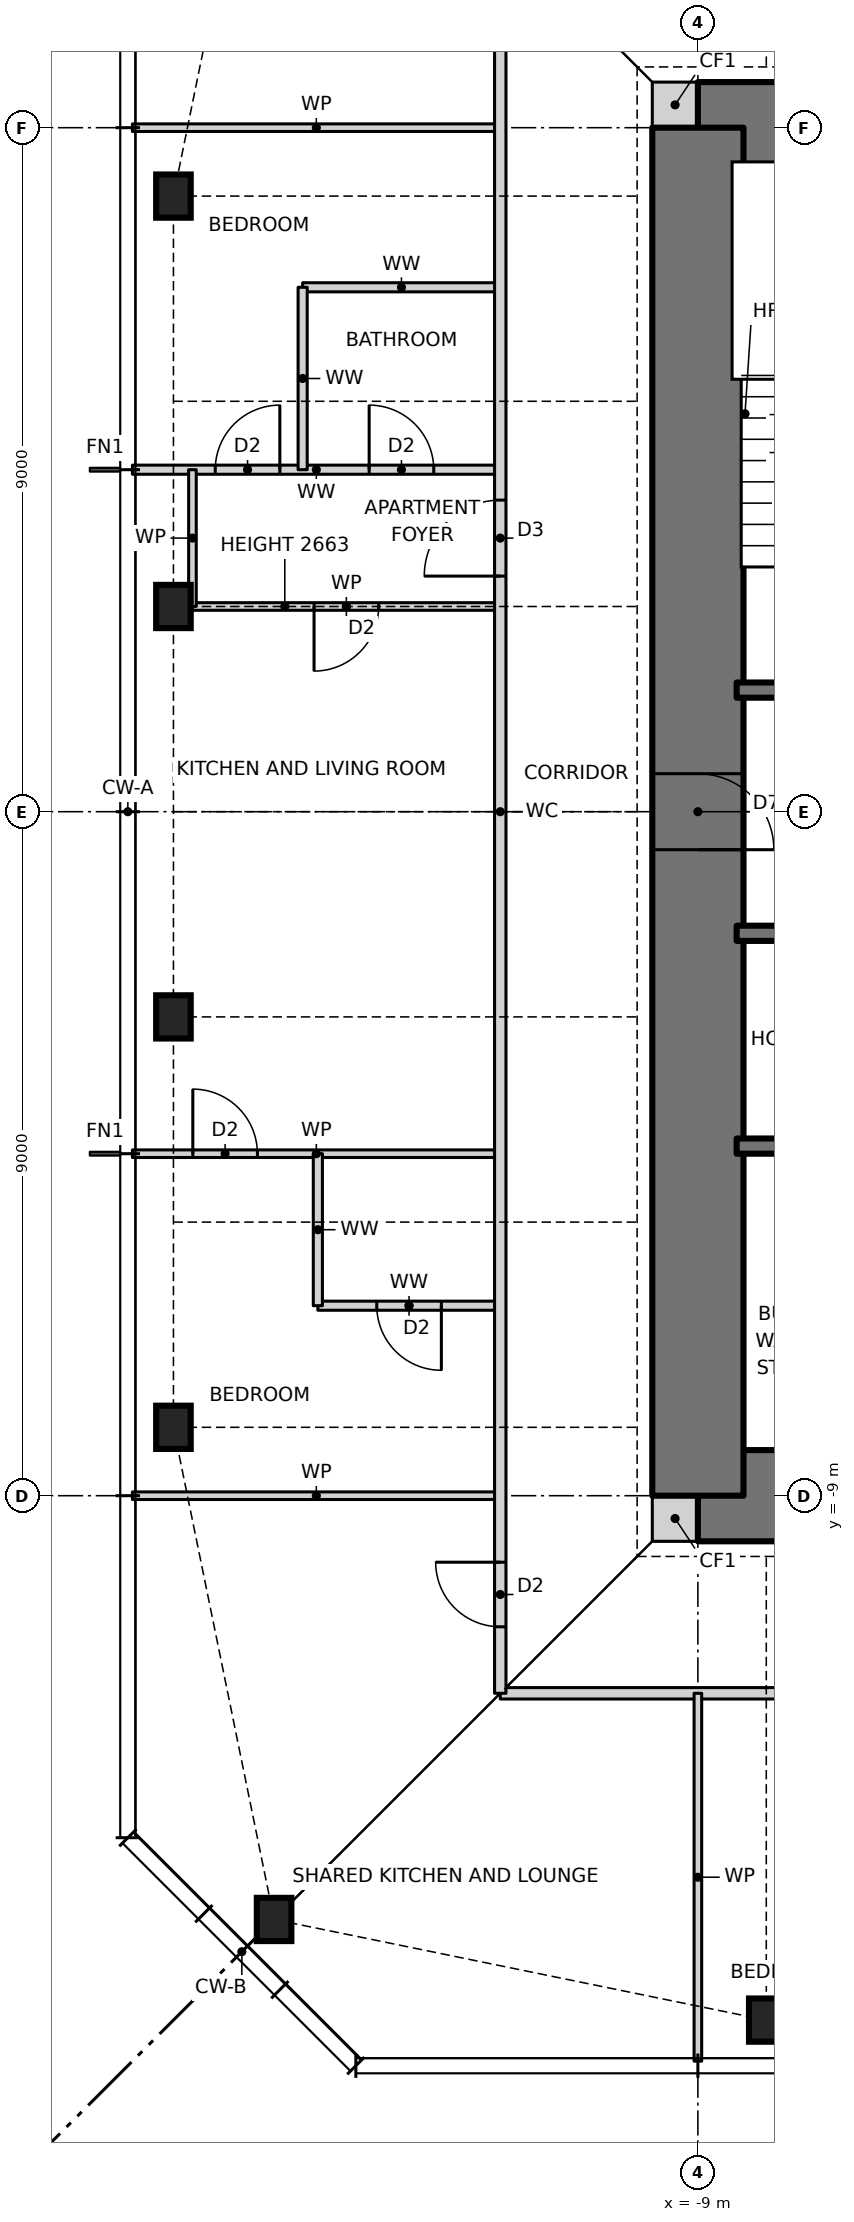
"""IFC4 building model, lengths in metres.
Left out: names, types, materials, properties, quantities, classifications, styles, units other than length and angle.
Written with IfcOpenShell. Run it as: python <this file> out.ifc"""

import sys

from ifc_helpers import new_model, si_unit, direction, frame, frame_2d, origin, origin_2d, place, context, subcontext, project, spatial, rectangle, i_section, extrude, element, fill, save


model = new_model("IFC4")
c1 = context("Model", 3, precision=1e-05, world=origin(), true_north=direction((0.0, 1.0)))
c2 = subcontext(c1, "Body", "Model", "MODEL_VIEW")
j1 = project(units=[si_unit("LENGTHUNIT", "METRE"), si_unit("PLANEANGLEUNIT", "RADIAN")], contexts=[c1])
p1 = place(None, origin())
s1 = spatial("IfcSite", under=j1, at=p1, CompositionType="ELEMENT")
p2 = place(p1, origin())
s2 = spatial("IfcBuilding", under=s1, at=p2, CompositionType="ELEMENT")
p3 = place(p2, frame((0.0, 0.0, 246.5)))
s3 = spatial("IfcBuildingStorey", under=s2, at=p3, CompositionType="ELEMENT", Elevation=246.5)
for number, where, z_axis, x_axis in (
    (1, (-14.576, -14.576, 0.0), (0.0, 0.0, 1.0), (1.0, 0.0, 0.0)),
    (2, (-8.1, -15.9, 0.0), (0.0, 0.0, 1.0), (1.0, 0.0, 0.0)),
    (3, (-15.9, 8.1, 0.0), (0.0, 0.0, 1.0), (1.0, 0.0, 0.0)),
    (4, (-15.9, 2.7, 0.0), (0.0, 0.0, 1.0), (1.0, 0.0, 0.0)),
    (5, (-15.9, -2.7, 0.0), (0.0, 0.0, 1.0), (1.0, 0.0, 0.0)),
    (6, (-15.9, -8.1, 0.0), (0.0, 0.0, 1.0), (1.0, 0.0, 0.0)),
):
    element("IfcColumn", number, at=place(p3, frame(where, z_axis=z_axis, x_axis=x_axis)), inside=s3, PredefinedType="COLUMN", context=c2, shape_type="SweptSolid", body=[
        extrude(i_section(OverallWidth=0.455, OverallDepth=0.569, WebThickness=0.078, FlangeThickness=0.125, at=origin_2d()), origin(), (0.0, 0.0, 1.0), 3.5),
    ])
for number, where, z_axis, x_axis in (
    (7, (-9.6, -9.3, 0.0), (0.0, 0.0, 1.0), (1.0, 0.0, 0.0)),
    (8, (-9.6, 9.3, 0.0), (0.0, 0.0, 1.0), (1.0, 0.0, 0.0)),
):
    element("IfcWall", number, at=place(p3, frame(where, z_axis=z_axis, x_axis=x_axis)), inside=s3, PredefinedType="SOLIDWALL", context=c2, shape_type="SweptSolid", body=[
        extrude(rectangle(XDim=0.6, YDim=0.6, at=frame_2d((0.3, 0.0))), origin(), (0.0, 0.0, 1.0), 3.5),
    ])
p4 = place(p3, frame((-9.0, -9.0, 0.0), z_axis=(0.0, 0.0, 1.0), x_axis=(1.0, 0.0, 0.0)))
e9 = element("IfcWall", 9, at=p4, inside=s3, PredefinedType="SHEAR", context=c2, shape_type="SweptSolid", body=[
    extrude(rectangle(XDim=18.0, YDim=1.2, at=frame_2d((9.0, 0.0))), origin(), (0.0, 0.0, 1.0), 3.5),
])
p5 = place(p4, frame((3.775, 0.0, 0.0)))
e10 = element("IfcOpeningElement", 10, at=p5, cuts=e9, PredefinedType="OPENING", context=c2, shape_type="SweptSolid", body=[
    extrude(rectangle(XDim=0.9, YDim=2.1, at=frame_2d((0.45, 1.05))), frame((0.0, 0.61, 0.0), z_axis=(0.0, -1.0, 0.0), x_axis=(1.0, 0.0, 0.0)), (0.0, 0.0, 1.0), 1.22),
])
p6 = place(p4, frame((10.625, 0.0, 0.0)))
e11 = element("IfcOpeningElement", 11, at=p6, cuts=e9, PredefinedType="OPENING", context=c2, shape_type="SweptSolid", body=[
    extrude(rectangle(XDim=0.9, YDim=2.1, at=frame_2d((0.45, 1.05))), frame((0.0, 0.61, 0.0), z_axis=(0.0, -1.0, 0.0), x_axis=(1.0, 0.0, 0.0)), (0.0, 0.0, 1.0), 1.22),
])
p7 = place(p3, frame((9.0, 9.0, 0.0), z_axis=(0.0, 0.0, 1.0), x_axis=(-1.0, 0.0, 0.0)))
e12 = element("IfcWall", 12, at=p7, inside=s3, PredefinedType="SHEAR", context=c2, shape_type="SweptSolid", body=[
    extrude(rectangle(XDim=18.0, YDim=1.2, at=frame_2d((9.0, 0.0))), origin(), (0.0, 0.0, 1.0), 3.5),
])
p8 = place(p7, frame((11.125, 0.0, 0.0)))
e13 = element("IfcOpeningElement", 13, at=p8, cuts=e12, PredefinedType="OPENING", context=c2, shape_type="SweptSolid", body=[
    extrude(rectangle(XDim=0.9, YDim=2.1, at=frame_2d((0.45, 1.05))), frame((0.0, 0.61, 0.0), z_axis=(0.0, -1.0, 0.0), x_axis=(1.0, 0.0, 0.0)), (0.0, 0.0, 1.0), 1.22),
])
p9 = place(p7, frame((4.275, 0.0, 0.0)))
e14 = element("IfcOpeningElement", 14, at=p9, cuts=e12, PredefinedType="OPENING", context=c2, shape_type="SweptSolid", body=[
    extrude(rectangle(XDim=0.9, YDim=2.1, at=frame_2d((0.45, 1.05))), frame((0.0, 0.61, 0.0), z_axis=(0.0, -1.0, 0.0), x_axis=(1.0, 0.0, 0.0)), (0.0, 0.0, 1.0), 1.22),
])
p10 = place(p3, frame((-9.0, 9.0, 0.0), z_axis=(0.0, 0.0, 1.0), x_axis=(0.0, -1.0, 0.0)))
e15 = element("IfcWall", 15, at=p10, inside=s3, PredefinedType="SHEAR", context=c2, shape_type="SweptSolid", body=[
    extrude(rectangle(XDim=18.0, YDim=1.2, at=frame_2d((9.0, 0.0))), origin(), (0.0, 0.0, 1.0), 3.5),
])
p11 = place(p10, frame((8.5, 0.0, 0.0)))
e16 = element("IfcOpeningElement", 16, at=p11, cuts=e15, PredefinedType="OPENING", context=c2, shape_type="SweptSolid", body=[
    extrude(rectangle(XDim=1.0, YDim=2.1, at=frame_2d((0.5, 1.05))), frame((0.0, 0.61, 0.0), z_axis=(0.0, -1.0, 0.0), x_axis=(1.0, 0.0, 0.0)), (0.0, 0.0, 1.0), 1.22),
])
p12 = place(p3, frame((-11.6, -11.6, 0.0), z_axis=(0.0, 0.0, 1.0), x_axis=(1.0, 0.0, 0.0)))
e17 = element("IfcWall", 17, at=p12, inside=s3, PredefinedType="PARTITIONING", context=c2, shape_type="SweptSolid", body=[
    extrude(rectangle(XDim=23.2, YDim=0.15, at=frame_2d((11.6, 0.0))), origin(), (0.0, 0.0, 1.0), 3.27),
])
p13 = place(p12, frame((7.5, 0.0, 0.0)))
e18 = element("IfcOpeningElement", 18, at=p13, cuts=e17, PredefinedType="OPENING", context=c2, shape_type="SweptSolid", body=[
    extrude(rectangle(XDim=1.0, YDim=2.1, at=frame_2d((0.5, 1.05))), frame((0.0, 0.085, 0.0), z_axis=(0.0, -1.0, 0.0), x_axis=(1.0, 0.0, 0.0)), (0.0, 0.0, 1.0), 0.17),
])
p14 = place(p12, frame((21.0, 0.0, 0.0)))
e19 = element("IfcOpeningElement", 19, at=p14, cuts=e17, PredefinedType="OPENING", context=c2, shape_type="SweptSolid", body=[
    extrude(rectangle(XDim=1.8, YDim=2.1, at=frame_2d((0.9, 1.05))), frame((0.0, 0.085, 0.0), z_axis=(0.0, -1.0, 0.0), x_axis=(1.0, 0.0, 0.0)), (0.0, 0.0, 1.0), 0.17),
])
p15 = place(p3, frame((-16.44, -9.0, 0.0), z_axis=(0.0, 0.0, 1.0), x_axis=(1.0, 0.0, 0.0)))
e20 = element("IfcWall", 20, at=p15, inside=s3, PredefinedType="PARTITIONING", context=c2, shape_type="SweptSolid", body=[
    extrude(rectangle(XDim=4.84, YDim=0.1, at=frame_2d((2.42, 0.0))), origin(), (0.0, 0.0, 1.0), 3.27),
])
p16 = place(p3, frame((-14.0, -6.5, 0.0), z_axis=(0.0, 0.0, 1.0), x_axis=(1.0, 0.0, 0.0)))
e21 = element("IfcWall", 21, at=p16, inside=s3, PredefinedType="PARTITIONING", context=c2, shape_type="SweptSolid", body=[
    extrude(rectangle(XDim=2.4, YDim=0.12, at=frame_2d((1.2, 0.0))), origin(), (0.0, 0.0, 1.0), 3.27),
])
p17 = place(p16, frame((0.775, 0.0, 0.0)))
e22 = element("IfcOpeningElement", 22, at=p17, cuts=e21, PredefinedType="OPENING", context=c2, shape_type="SweptSolid", body=[
    extrude(rectangle(XDim=0.85, YDim=2.1, at=frame_2d((0.425, 1.05))), frame((0.0, 0.07, 0.0), z_axis=(0.0, -1.0, 0.0), x_axis=(1.0, 0.0, 0.0)), (0.0, 0.0, 1.0), 0.14),
])
p18 = place(p3, frame((-16.44, -4.5, 0.0), z_axis=(0.0, 0.0, 1.0), x_axis=(1.0, 0.0, 0.0)))
e23 = element("IfcWall", 23, at=p18, inside=s3, PredefinedType="PARTITIONING", context=c2, shape_type="SweptSolid", body=[
    extrude(rectangle(XDim=4.84, YDim=0.1, at=frame_2d((2.42, 0.0))), origin(), (0.0, 0.0, 1.0), 3.27),
])
p19 = place(p18, frame((0.795, 0.0, 0.0)))
e24 = element("IfcOpeningElement", 24, at=p19, cuts=e23, PredefinedType="OPENING", context=c2, shape_type="SweptSolid", body=[
    extrude(rectangle(XDim=0.85, YDim=2.1, at=frame_2d((0.425, 1.05))), frame((0.0, 0.06, 0.0), z_axis=(0.0, -1.0, 0.0), x_axis=(1.0, 0.0, 0.0)), (0.0, 0.0, 1.0), 0.12),
])
p20 = place(p3, frame((-8.49, -4.4, 0.0), z_axis=(0.0, 0.0, 1.0), x_axis=(1.0, 0.0, 0.0)))
e25 = element("IfcWall", 25, at=p20, inside=s3, PredefinedType="SOLIDWALL", context=c2, shape_type="SweptSolid", body=[
    extrude(rectangle(XDim=13.64, YDim=0.2, at=frame_2d((6.82, 0.0))), origin(), (0.0, 0.0, 1.0), 3.5),
])
p21 = place(p3, frame((-8.49, -1.6, 0.0), z_axis=(0.0, 0.0, 1.0), x_axis=(1.0, 0.0, 0.0)))
e26 = element("IfcWall", 26, at=p21, inside=s3, PredefinedType="SOLIDWALL", context=c2, shape_type="SweptSolid", body=[
    extrude(rectangle(XDim=16.98, YDim=0.2, at=frame_2d((8.49, 0.0))), origin(), (0.0, 0.0, 1.0), 3.5),
])
p22 = place(p21, frame((14.81, 0.0, 0.0)))
e27 = element("IfcOpeningElement", 27, at=p22, cuts=e26, PredefinedType="OPENING", context=c2, shape_type="SweptSolid", body=[
    extrude(rectangle(XDim=1.0, YDim=2.1, at=frame_2d((0.5, 1.05))), frame((0.0, 0.11, 0.0), z_axis=(0.0, -1.0, 0.0), x_axis=(1.0, 0.0, 0.0)), (0.0, 0.0, 1.0), 0.22),
])
p23 = place(p21, frame((1.232, 0.0, 0.0)))
e28 = element("IfcOpeningElement", 28, at=p23, cuts=e26, PredefinedType="OPENING", context=c2, shape_type="SweptSolid", body=[
    extrude(rectangle(XDim=0.9, YDim=2.1, at=frame_2d((0.45, 1.05))), frame((0.0, 0.11, 0.0), z_axis=(0.0, -1.0, 0.0), x_axis=(1.0, 0.0, 0.0)), (0.0, 0.0, 1.0), 0.22),
])
p24 = place(p21, frame((4.627, 0.0, 0.0)))
e29 = element("IfcOpeningElement", 29, at=p24, cuts=e26, PredefinedType="OPENING", context=c2, shape_type="SweptSolid", body=[
    extrude(rectangle(XDim=0.9, YDim=2.1, at=frame_2d((0.45, 1.05))), frame((0.0, 0.11, 0.0), z_axis=(0.0, -1.0, 0.0), x_axis=(1.0, 0.0, 0.0)), (0.0, 0.0, 1.0), 0.22),
])
p25 = place(p21, frame((8.052, 0.0, 0.0)))
e30 = element("IfcOpeningElement", 30, at=p25, cuts=e26, PredefinedType="OPENING", context=c2, shape_type="SweptSolid", body=[
    extrude(rectangle(XDim=0.9, YDim=2.1, at=frame_2d((0.45, 1.05))), frame((0.0, 0.11, 0.0), z_axis=(0.0, -1.0, 0.0), x_axis=(1.0, 0.0, 0.0)), (0.0, 0.0, 1.0), 0.22),
])
p26 = place(p21, frame((11.478, 0.0, 0.0)))
e31 = element("IfcOpeningElement", 31, at=p26, cuts=e26, PredefinedType="OPENING", context=c2, shape_type="SweptSolid", body=[
    extrude(rectangle(XDim=0.9, YDim=2.1, at=frame_2d((0.45, 1.05))), frame((0.0, 0.11, 0.0), z_axis=(0.0, -1.0, 0.0), x_axis=(1.0, 0.0, 0.0)), (0.0, 0.0, 1.0), 0.22),
])
p27 = place(p3, frame((-8.49, 1.6, 0.0), z_axis=(0.0, 0.0, 1.0), x_axis=(1.0, 0.0, 0.0)))
e32 = element("IfcWall", 32, at=p27, inside=s3, PredefinedType="SOLIDWALL", context=c2, shape_type="SweptSolid", body=[
    extrude(rectangle(XDim=16.98, YDim=0.2, at=frame_2d((8.49, 0.0))), origin(), (0.0, 0.0, 1.0), 3.5),
])
p28 = place(p27, frame((1.17, 0.0, 0.0)))
e33 = element("IfcOpeningElement", 33, at=p28, cuts=e32, PredefinedType="OPENING", context=c2, shape_type="SweptSolid", body=[
    extrude(rectangle(XDim=1.0, YDim=2.1, at=frame_2d((0.5, 1.05))), frame((0.0, 0.11, 0.0), z_axis=(0.0, -1.0, 0.0), x_axis=(1.0, 0.0, 0.0)), (0.0, 0.0, 1.0), 0.22),
])
p29 = place(p27, frame((4.606, 0.0, 0.0)))
e34 = element("IfcOpeningElement", 34, at=p29, cuts=e32, PredefinedType="OPENING", context=c2, shape_type="SweptSolid", body=[
    extrude(rectangle(XDim=0.9, YDim=2.1, at=frame_2d((0.45, 1.05))), frame((0.0, 0.11, 0.0), z_axis=(0.0, -1.0, 0.0), x_axis=(1.0, 0.0, 0.0)), (0.0, 0.0, 1.0), 0.22),
])
p30 = place(p27, frame((8.04, 0.0, 0.0)))
e35 = element("IfcOpeningElement", 35, at=p30, cuts=e32, PredefinedType="OPENING", context=c2, shape_type="SweptSolid", body=[
    extrude(rectangle(XDim=0.9, YDim=2.1, at=frame_2d((0.45, 1.05))), frame((0.0, 0.11, 0.0), z_axis=(0.0, -1.0, 0.0), x_axis=(1.0, 0.0, 0.0)), (0.0, 0.0, 1.0), 0.22),
])
p31 = place(p27, frame((11.374, 0.0, 0.0)))
e36 = element("IfcOpeningElement", 36, at=p31, cuts=e32, PredefinedType="OPENING", context=c2, shape_type="SweptSolid", body=[
    extrude(rectangle(XDim=1.1, YDim=2.1, at=frame_2d((0.55, 1.05))), frame((0.0, 0.11, 0.0), z_axis=(0.0, -1.0, 0.0), x_axis=(1.0, 0.0, 0.0)), (0.0, 0.0, 1.0), 0.22),
])
p32 = place(p27, frame((14.66, 0.0, 0.0)))
e37 = element("IfcOpeningElement", 37, at=p32, cuts=e32, PredefinedType="OPENING", context=c2, shape_type="SweptSolid", body=[
    extrude(rectangle(XDim=1.3, YDim=2.1, at=frame_2d((0.65, 1.05))), frame((0.0, 0.11, 0.0), z_axis=(0.0, -1.0, 0.0), x_axis=(1.0, 0.0, 0.0)), (0.0, 0.0, 1.0), 0.22),
])
p33 = place(p3, frame((-15.65, 2.7, 0.0), z_axis=(0.0, 0.0, 1.0), x_axis=(1.0, 0.0, 0.0)))
e38 = element("IfcWall", 38, at=p33, inside=s3, PredefinedType="PARTITIONING", context=c2, shape_type="SweptSolid", body=[
    extrude(rectangle(XDim=4.05, YDim=0.1, at=frame_2d((2.025, 0.0))), origin(), (0.0, 0.0, 1.0), 2.663),
])
p34 = place(p33, frame((1.6, 0.0, 0.0)))
e39 = element("IfcOpeningElement", 39, at=p34, cuts=e38, PredefinedType="OPENING", context=c2, shape_type="SweptSolid", body=[
    extrude(rectangle(XDim=0.85, YDim=2.1, at=frame_2d((0.425, 1.05))), frame((0.0, 0.06, 0.0), z_axis=(0.0, -1.0, 0.0), x_axis=(1.0, 0.0, 0.0)), (0.0, 0.0, 1.0), 0.12),
])
p35 = place(p3, frame((-16.44, 4.5, 0.0), z_axis=(0.0, 0.0, 1.0), x_axis=(1.0, 0.0, 0.0)))
e40 = element("IfcWall", 40, at=p35, inside=s3, PredefinedType="PARTITIONING", context=c2, shape_type="SweptSolid", body=[
    extrude(rectangle(XDim=4.84, YDim=0.12, at=frame_2d((2.42, 0.0))), origin(), (0.0, 0.0, 1.0), 3.27),
])
p36 = place(p35, frame((1.09, 0.0, 0.0)))
e41 = element("IfcOpeningElement", 41, at=p36, cuts=e40, PredefinedType="OPENING", context=c2, shape_type="SweptSolid", body=[
    extrude(rectangle(XDim=0.85, YDim=2.1, at=frame_2d((0.425, 1.05))), frame((0.0, 0.07, 0.0), z_axis=(0.0, -1.0, 0.0), x_axis=(1.0, 0.0, 0.0)), (0.0, 0.0, 1.0), 0.14),
])
p37 = place(p35, frame((3.115, 0.0, 0.0)))
e42 = element("IfcOpeningElement", 42, at=p37, cuts=e40, PredefinedType="OPENING", context=c2, shape_type="SweptSolid", body=[
    extrude(rectangle(XDim=0.85, YDim=2.1, at=frame_2d((0.425, 1.05))), frame((0.0, 0.07, 0.0), z_axis=(0.0, -1.0, 0.0), x_axis=(1.0, 0.0, 0.0)), (0.0, 0.0, 1.0), 0.14),
])
p38 = place(p3, frame((-14.2, 6.9, 0.0), z_axis=(0.0, 0.0, 1.0), x_axis=(1.0, 0.0, 0.0)))
e43 = element("IfcWall", 43, at=p38, inside=s3, PredefinedType="PARTITIONING", context=c2, shape_type="SweptSolid", body=[
    extrude(rectangle(XDim=2.6, YDim=0.12, at=frame_2d((1.3, 0.0))), origin(), (0.0, 0.0, 1.0), 3.27),
])
for number, where, z_axis, x_axis in (
    (44, (-16.44, 9.0, 0.0), (0.0, 0.0, 1.0), (1.0, 0.0, 0.0)),
    (45, (-9.0, -16.44, 0.0), (0.0, 0.0, 1.0), (0.0, 1.0, 0.0)),
):
    element("IfcWall", number, at=place(p3, frame(where, z_axis=z_axis, x_axis=x_axis)), inside=s3, PredefinedType="PARTITIONING", context=c2, shape_type="SweptSolid", body=[
        extrude(rectangle(XDim=4.84, YDim=0.1, at=frame_2d((2.42, 0.0))), origin(), (0.0, 0.0, 1.0), 3.27),
    ])
p39 = place(p3, frame((-11.6, -11.6, 0.0), z_axis=(0.0, 0.0, 1.0), x_axis=(0.0, 1.0, 0.0)))
e46 = element("IfcWall", 46, at=p39, inside=s3, PredefinedType="PARTITIONING", context=c2, shape_type="SweptSolid", body=[
    extrude(rectangle(XDim=23.2, YDim=0.15, at=frame_2d((11.6, 0.0))), origin(), (0.0, 0.0, 1.0), 3.27),
])
p40 = place(p39, frame((14.7, 0.0, 0.0)))
e47 = element("IfcOpeningElement", 47, at=p40, cuts=e46, PredefinedType="OPENING", context=c2, shape_type="SweptSolid", body=[
    extrude(rectangle(XDim=1.0, YDim=2.1, at=frame_2d((0.5, 1.05))), frame((0.0, 0.085, 0.0), z_axis=(0.0, -1.0, 0.0), x_axis=(1.0, 0.0, 0.0)), (0.0, 0.0, 1.0), 0.17),
])
p41 = place(p39, frame((0.875, 0.0, 0.0)))
e48 = element("IfcOpeningElement", 48, at=p41, cuts=e46, PredefinedType="OPENING", context=c2, shape_type="SweptSolid", body=[
    extrude(rectangle(XDim=0.85, YDim=2.1, at=frame_2d((0.425, 1.05))), frame((0.0, 0.085, 0.0), z_axis=(0.0, -1.0, 0.0), x_axis=(1.0, 0.0, 0.0)), (0.0, 0.0, 1.0), 0.17),
])
p42 = place(p3, frame((-14.0, -6.5, 0.0), z_axis=(0.0, 0.0, 1.0), x_axis=(0.0, 1.0, 0.0)))
e49 = element("IfcWall", 49, at=p42, inside=s3, PredefinedType="PARTITIONING", context=c2, shape_type="SweptSolid", body=[
    extrude(rectangle(XDim=2.0, YDim=0.12, at=frame_2d((1.0, 0.0))), origin(), (0.0, 0.0, 1.0), 3.27),
])
p43 = place(p3, frame((-14.2, 4.5, 0.0), z_axis=(0.0, 0.0, 1.0), x_axis=(0.0, 1.0, 0.0)))
e50 = element("IfcWall", 50, at=p43, inside=s3, PredefinedType="PARTITIONING", context=c2, shape_type="SweptSolid", body=[
    extrude(rectangle(XDim=2.4, YDim=0.12, at=frame_2d((1.2, 0.0))), origin(), (0.0, 0.0, 1.0), 3.27),
])
p44 = place(p3, frame((-15.65, 2.7, 0.0), z_axis=(0.0, 0.0, 1.0), x_axis=(0.0, 1.0, 0.0)))
e51 = element("IfcWall", 51, at=p44, inside=s3, PredefinedType="PARTITIONING", context=c2, shape_type="SweptSolid", body=[
    extrude(rectangle(XDim=1.8, YDim=0.1, at=frame_2d((0.9, 0.0))), origin(), (0.0, 0.0, 1.0), 3.27),
])
p45 = place(p40, origin())
e52 = element("IfcDoor", 52, at=p45, inside=s3, OperationType="SINGLE_SWING_LEFT", PredefinedType="DOOR", context=c2, shape_type="SweptSolid", body=[
    extrude(rectangle(XDim=1.0, YDim=2.1, at=frame_2d((0.5, 1.05))), frame((0.0, 0.025, 0.0), z_axis=(0.0, -1.0, 0.0), x_axis=(1.0, 0.0, 0.0)), (0.0, 0.0, 1.0), 0.05),
])
fill(e47, e52)
p46 = place(p34, frame((0.85, 0.0, 0.0), z_axis=(0.0, 0.0, 1.0), x_axis=(-1.0, 0.0, 0.0)))
e53 = element("IfcDoor", 53, at=p46, inside=s3, OperationType="SINGLE_SWING_RIGHT", PredefinedType="DOOR", context=c2, shape_type="SweptSolid", body=[
    extrude(rectangle(XDim=0.85, YDim=2.1, at=frame_2d((0.425, 1.05))), frame((0.0, 0.025, 0.0), z_axis=(0.0, -1.0, 0.0), x_axis=(1.0, 0.0, 0.0)), (0.0, 0.0, 1.0), 0.05),
])
fill(e39, e53)
p47 = place(p36, origin())
e54 = element("IfcDoor", 54, at=p47, inside=s3, OperationType="SINGLE_SWING_RIGHT", PredefinedType="DOOR", context=c2, shape_type="SweptSolid", body=[
    extrude(rectangle(XDim=0.85, YDim=2.1, at=frame_2d((0.425, 1.05))), frame((0.0, 0.025, 0.0), z_axis=(0.0, -1.0, 0.0), x_axis=(1.0, 0.0, 0.0)), (0.0, 0.0, 1.0), 0.05),
])
fill(e41, e54)
p48 = place(p37, origin())
e55 = element("IfcDoor", 55, at=p48, inside=s3, OperationType="SINGLE_SWING_LEFT", PredefinedType="DOOR", context=c2, shape_type="SweptSolid", body=[
    extrude(rectangle(XDim=0.85, YDim=2.1, at=frame_2d((0.425, 1.05))), frame((0.0, 0.025, 0.0), z_axis=(0.0, -1.0, 0.0), x_axis=(1.0, 0.0, 0.0)), (0.0, 0.0, 1.0), 0.05),
])
fill(e42, e55)
p49 = place(p19, origin())
e56 = element("IfcDoor", 56, at=p49, inside=s3, OperationType="SINGLE_SWING_LEFT", PredefinedType="DOOR", context=c2, shape_type="SweptSolid", body=[
    extrude(rectangle(XDim=0.85, YDim=2.1, at=frame_2d((0.425, 1.05))), frame((0.0, 0.025, 0.0), z_axis=(0.0, -1.0, 0.0), x_axis=(1.0, 0.0, 0.0)), (0.0, 0.0, 1.0), 0.05),
])
fill(e24, e56)
p50 = place(p17, frame((0.85, 0.0, 0.0), z_axis=(0.0, 0.0, 1.0), x_axis=(-1.0, 0.0, 0.0)))
e57 = element("IfcDoor", 57, at=p50, inside=s3, OperationType="SINGLE_SWING_LEFT", PredefinedType="DOOR", context=c2, shape_type="SweptSolid", body=[
    extrude(rectangle(XDim=0.85, YDim=2.1, at=frame_2d((0.425, 1.05))), frame((0.0, 0.025, 0.0), z_axis=(0.0, -1.0, 0.0), x_axis=(1.0, 0.0, 0.0)), (0.0, 0.0, 1.0), 0.05),
])
fill(e22, e57)
p51 = place(p41, origin())
e58 = element("IfcDoor", 58, at=p51, inside=s3, OperationType="SINGLE_SWING_RIGHT", PredefinedType="DOOR", context=c2, shape_type="SweptSolid", body=[
    extrude(rectangle(XDim=0.85, YDim=2.1, at=frame_2d((0.425, 1.05))), frame((0.0, 0.025, 0.0), z_axis=(0.0, -1.0, 0.0), x_axis=(1.0, 0.0, 0.0)), (0.0, 0.0, 1.0), 0.05),
])
fill(e48, e58)
p52 = place(p11, origin())
e59 = element("IfcDoor", 59, at=p52, inside=s3, OperationType="SINGLE_SWING_RIGHT", PredefinedType="DOOR", context=c2, shape_type="SweptSolid", body=[
    extrude(rectangle(XDim=1.0, YDim=2.1, at=frame_2d((0.5, 1.05))), frame((0.0, 0.025, 0.0), z_axis=(0.0, -1.0, 0.0), x_axis=(1.0, 0.0, 0.0)), (0.0, 0.0, 1.0), 0.05),
])
fill(e16, e59)
save(model, sys.argv[1])
